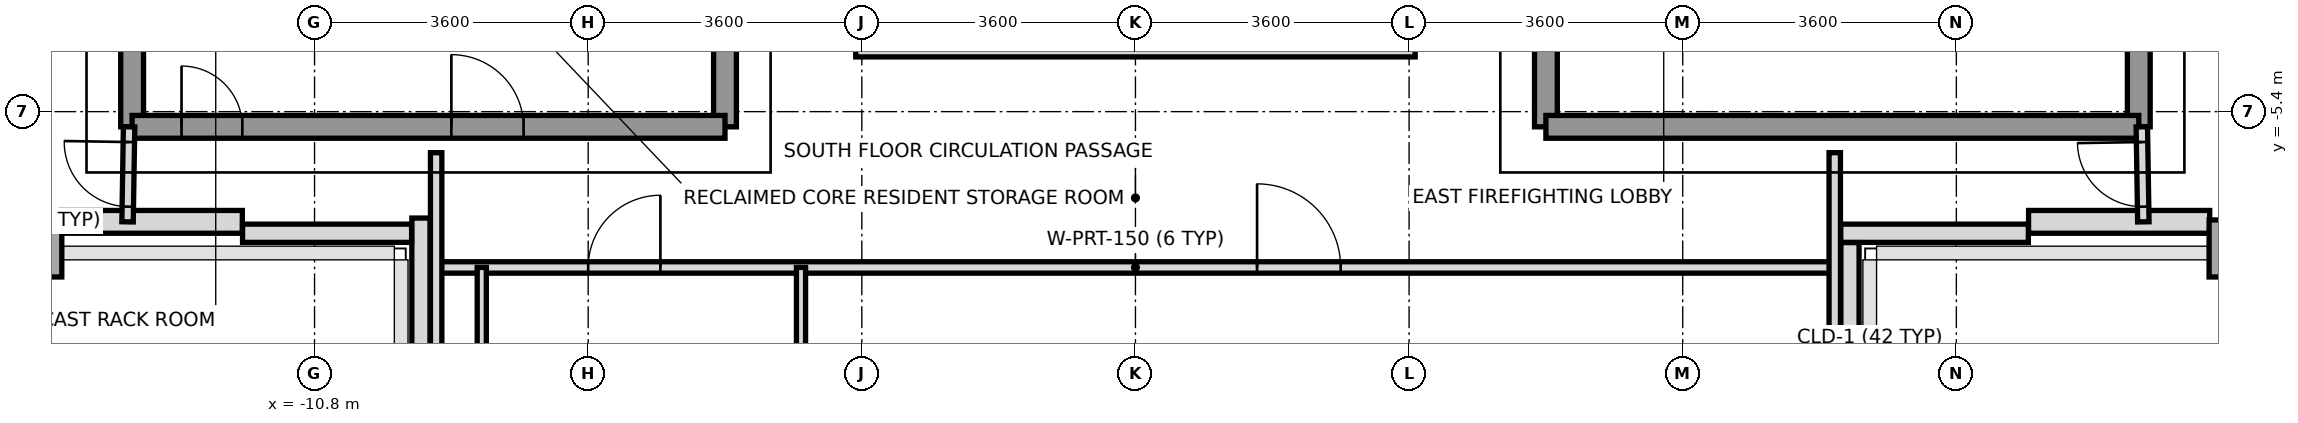
"""IFC4 building model, lengths in metres.
Left out: names, types, materials, properties, quantities, classifications, styles, units other than length and angle.
Written with IfcOpenShell. Run it as: python <this file> out.ifc"""

import sys

from ifc_helpers import new_model, si_unit, direction, frame, frame_2d, origin, origin_2d, place, context, subcontext, project, spatial, rectangle, extrude, source, transform, mapped, element, fill, save


model = new_model("IFC4")
c1 = context("Model", 3, precision=1e-05, world=origin(), true_north=direction((0.0, 1.0)))
c2 = subcontext(c1, "Body", "Model", "MODEL_VIEW")
j1 = project(units=[si_unit("LENGTHUNIT", "METRE"), si_unit("PLANEANGLEUNIT", "RADIAN")], contexts=[c1])
p1 = place(None, origin())
s1 = spatial("IfcSite", under=j1, at=p1, CompositionType="ELEMENT")
p2 = place(p1, origin())
s2 = spatial("IfcBuilding", under=s1, at=p2, CompositionType="ELEMENT")
p3 = place(p2, frame((0.0, 0.0, 242.8)))
s3 = spatial("IfcBuildingStorey", under=s2, at=p3, CompositionType="ELEMENT", Elevation=242.8)
m1 = source(origin(), c2, "Body", "SweptSolid", [
    extrude(rectangle(XDim=0.55, YDim=0.75, at=origin_2d()), origin(), (0.0, 0.0, 1.0), 3.01),
])
for number, where, z_axis, x_axis in (
    (1, (-14.4, -7.2, 0.0), (0.0, 0.0, 1.0), (1.0, 0.0, 0.0)),
    (2, (14.4, -7.2, 0.0), (0.0, 0.0, 1.0), (1.0, 0.0, 0.0)),
):
    element("IfcColumn", number, at=place(p3, frame(where, z_axis=z_axis, x_axis=x_axis)), inside=s3, PredefinedType="COLUMN", context=c2, shape_type="MappedRepresentation", body=[
        mapped(m1, transform((0.0, 0.0, 0.0), x_axis=(1.0, 0.0, 0.0), y_axis=(0.0, 1.0, 0.0), z_axis=(0.0, 0.0, 1.0), scale=1.0)),
    ])
for number, where, z_axis, x_axis in (
    (3, (-14.133, -6.85, 0.0), (0.0, 0.0, 1.0), (1.0, 0.0, 0.0)),
    (4, (11.75, -6.85, 0.0), (0.0, 0.0, 1.0), (1.0, 0.0, 0.0)),
):
    element("IfcWall", number, at=place(p3, frame(where, z_axis=z_axis, x_axis=x_axis)), inside=s3, PredefinedType="SOLIDWALL", context=c2, shape_type="SweptSolid", body=[
        extrude(rectangle(XDim=2.383, YDim=0.3, at=frame_2d((1.191, 0.0))), origin(), (0.0, 0.0, 1.0), 2.57),
    ])
p4 = place(p3, frame((11.747, -7.0, 0.0), z_axis=(0.0, 0.0, 1.0), x_axis=(-1.0, 0.0, 0.0)))
e5 = element("IfcWall", 5, at=p4, inside=s3, PredefinedType="PARAPET", context=c2, shape_type="SweptSolid", body=[
    extrude(rectangle(XDim=2.469, YDim=0.24, at=frame_2d((1.234, 0.0))), origin(), (0.0, 0.0, 1.0), 1.15),
])
p5 = place(p3, frame((9.4, -7.123, 0.0), z_axis=(0.0, 0.0, 1.0), x_axis=(0.0, -1.0, 0.0)))
e6 = element("IfcWall", 6, at=p5, inside=s3, PredefinedType="PARAPET", context=c2, shape_type="SweptSolid", body=[
    extrude(rectangle(XDim=1.499, YDim=0.24, at=frame_2d((0.75, 0.0))), origin(), (0.0, 0.0, 1.0), 1.15),
])
p6 = place(p3, frame((-9.4, -8.622, 0.0), z_axis=(0.0, 0.0, 1.0), x_axis=(0.0, 1.0, 0.0)))
e7 = element("IfcWall", 7, at=p6, inside=s3, PredefinedType="PARAPET", context=c2, shape_type="SweptSolid", body=[
    extrude(rectangle(XDim=1.822, YDim=0.24, at=frame_2d((0.911, 0.0))), origin(), (0.0, 0.0, 1.0), 1.15),
])
p7 = place(p3, frame((-9.523, -7.0, 0.0), z_axis=(0.0, 0.0, 1.0), x_axis=(-1.0, 0.0, 0.0)))
e8 = element("IfcWall", 8, at=p7, inside=s3, PredefinedType="PARAPET", context=c2, shape_type="SweptSolid", body=[
    extrude(rectangle(XDim=2.224, YDim=0.24, at=frame_2d((1.112, 0.0))), origin(), (0.0, 0.0, 1.0), 1.15),
])
p8 = place(p3, frame((-13.2, -5.6, 0.0), z_axis=(0.0, 0.0, 1.0), x_axis=(0.0, 1.0, 0.0)))
e9 = element("IfcWall", 9, at=p8, inside=s3, PredefinedType="SHEAR", context=c2, shape_type="SweptSolid", body=[
    extrude(rectangle(XDim=11.2, YDim=0.3, at=frame_2d((5.6, 0.0))), origin(), (0.0, 0.0, 1.0), 3.01),
])
p9 = place(p3, frame((-5.4, -5.6, 0.0), z_axis=(0.0, 0.0, 1.0), x_axis=(0.0, 1.0, 0.0)))
e10 = element("IfcWall", 10, at=p9, inside=s3, PredefinedType="SHEAR", context=c2, shape_type="SweptSolid", body=[
    extrude(rectangle(XDim=12.5, YDim=0.3, at=frame_2d((6.25, 0.0))), origin(), (0.0, 0.0, 1.0), 3.01),
])
p10 = place(p9, frame((4.55, 0.0, 0.0)))
e11 = element("IfcOpeningElement", 11, at=p10, cuts=e10, PredefinedType="OPENING", context=c2, shape_type="SweptSolid", body=[
    extrude(rectangle(XDim=1.2, YDim=2.2, at=frame_2d((0.6, 1.1))), frame((0.0, 0.16, 0.0), z_axis=(0.0, -1.0, 0.0), x_axis=(1.0, 0.0, 0.0)), (0.0, 0.0, 1.0), 0.32),
])
p11 = place(p9, frame((10.45, 0.0, 0.0)))
e12 = element("IfcOpeningElement", 12, at=p11, cuts=e10, PredefinedType="OPENING", context=c2, shape_type="SweptSolid", body=[
    extrude(rectangle(XDim=1.2, YDim=2.2, at=frame_2d((0.6, 1.1))), frame((0.0, 0.16, 0.0), z_axis=(0.0, -1.0, 0.0), x_axis=(1.0, 0.0, 0.0)), (0.0, 0.0, 1.0), 0.32),
])
p12 = place(p9, frame((6.86, 0.0, 0.0)))
e13 = element("IfcOpeningElement", 13, at=p12, cuts=e10, PredefinedType="OPENING", context=c2, shape_type="SweptSolid", body=[
    extrude(rectangle(XDim=0.8, YDim=2.1, at=frame_2d((0.4, 1.05))), frame((0.0, 0.16, 0.0), z_axis=(0.0, -1.0, 0.0), x_axis=(1.0, 0.0, 0.0)), (0.0, 0.0, 1.0), 0.32),
])
p13 = place(p3, frame((-13.2, -5.6, 0.0), z_axis=(0.0, 0.0, 1.0), x_axis=(1.0, 0.0, 0.0)))
e14 = element("IfcWall", 14, at=p13, inside=s3, PredefinedType="SHEAR", context=c2, shape_type="SweptSolid", body=[
    extrude(rectangle(XDim=7.8, YDim=0.3, at=frame_2d((3.9, 0.0))), origin(), (0.0, 0.0, 1.0), 3.01),
])
p14 = place(p13, frame((0.65, 0.0, 0.0)))
e15 = element("IfcOpeningElement", 15, at=p14, cuts=e14, PredefinedType="OPENING", context=c2, shape_type="SweptSolid", body=[
    extrude(rectangle(XDim=0.8, YDim=2.1, at=frame_2d((0.4, 1.05))), frame((0.0, 0.16, 0.0), z_axis=(0.0, -1.0, 0.0), x_axis=(1.0, 0.0, 0.0)), (0.0, 0.0, 1.0), 0.32),
])
p15 = place(p13, frame((4.2, 0.0, 0.0)))
e16 = element("IfcOpeningElement", 16, at=p15, cuts=e14, PredefinedType="OPENING", context=c2, shape_type="SweptSolid", body=[
    extrude(rectangle(XDim=0.95, YDim=2.15, at=frame_2d((0.475, 1.075))), frame((0.0, 0.16, 0.0), z_axis=(0.0, -1.0, 0.0), x_axis=(1.0, 0.0, 0.0)), (0.0, 0.0, 1.0), 0.32),
])
p16 = place(p3, frame((13.2, -5.6, 0.0), z_axis=(0.0, 0.0, 1.0), x_axis=(0.0, 1.0, 0.0)))
e17 = element("IfcWall", 17, at=p16, inside=s3, PredefinedType="SHEAR", context=c2, shape_type="SweptSolid", body=[
    extrude(rectangle(XDim=11.2, YDim=0.3, at=frame_2d((5.6, 0.0))), origin(), (0.0, 0.0, 1.0), 3.01),
])
p17 = place(p3, frame((5.4, -5.6, 0.0), z_axis=(0.0, 0.0, 1.0), x_axis=(0.0, 1.0, 0.0)))
e18 = element("IfcWall", 18, at=p17, inside=s3, PredefinedType="SHEAR", context=c2, shape_type="SweptSolid", body=[
    extrude(rectangle(XDim=12.5, YDim=0.3, at=frame_2d((6.25, 0.0))), origin(), (0.0, 0.0, 1.0), 3.01),
])
p18 = place(p17, frame((4.55, 0.0, 0.0)))
e19 = element("IfcOpeningElement", 19, at=p18, cuts=e18, PredefinedType="OPENING", context=c2, shape_type="SweptSolid", body=[
    extrude(rectangle(XDim=1.2, YDim=2.2, at=frame_2d((0.6, 1.1))), frame((0.0, 0.16, 0.0), z_axis=(0.0, -1.0, 0.0), x_axis=(1.0, 0.0, 0.0)), (0.0, 0.0, 1.0), 0.32),
])
p19 = place(p17, frame((10.45, 0.0, 0.0)))
e20 = element("IfcOpeningElement", 20, at=p19, cuts=e18, PredefinedType="OPENING", context=c2, shape_type="SweptSolid", body=[
    extrude(rectangle(XDim=1.2, YDim=2.2, at=frame_2d((0.6, 1.1))), frame((0.0, 0.16, 0.0), z_axis=(0.0, -1.0, 0.0), x_axis=(1.0, 0.0, 0.0)), (0.0, 0.0, 1.0), 0.32),
])
p20 = place(p17, frame((6.86, 0.0, 0.0)))
e21 = element("IfcOpeningElement", 21, at=p20, cuts=e18, PredefinedType="OPENING", context=c2, shape_type="SweptSolid", body=[
    extrude(rectangle(XDim=0.8, YDim=2.1, at=frame_2d((0.4, 1.05))), frame((0.0, 0.16, 0.0), z_axis=(0.0, -1.0, 0.0), x_axis=(1.0, 0.0, 0.0)), (0.0, 0.0, 1.0), 0.32),
])
p21 = place(p3, frame((5.4, -5.6, 0.0), z_axis=(0.0, 0.0, 1.0), x_axis=(1.0, 0.0, 0.0)))
e22 = element("IfcWall", 22, at=p21, inside=s3, PredefinedType="SHEAR", context=c2, shape_type="SweptSolid", body=[
    extrude(rectangle(XDim=7.8, YDim=0.3, at=frame_2d((3.9, 0.0))), origin(), (0.0, 0.0, 1.0), 3.01),
])
p22 = place(p3, frame((-9.2, -7.45, 0.0), z_axis=(0.0, 0.0, 1.0), x_axis=(1.0, 0.0, 0.0)))
e23 = element("IfcWall", 23, at=p22, inside=s3, PredefinedType="PARTITIONING", context=c2, shape_type="SweptSolid", body=[
    extrude(rectangle(XDim=18.4, YDim=0.15, at=frame_2d((9.2, 0.0))), origin(), (0.0, 0.0, 1.0), 2.57),
])
p23 = place(p22, frame((2.0, 0.0, 0.0)))
e24 = element("IfcOpeningElement", 24, at=p23, cuts=e23, PredefinedType="OPENING", context=c2, shape_type="SweptSolid", body=[
    extrude(rectangle(XDim=0.95, YDim=2.15, at=frame_2d((0.475, 1.075))), frame((0.0, 0.085, 0.0), z_axis=(0.0, -1.0, 0.0), x_axis=(1.0, 0.0, 0.0)), (0.0, 0.0, 1.0), 0.17),
])
p24 = place(p22, frame((10.8, 0.0, 0.0)))
e25 = element("IfcOpeningElement", 25, at=p24, cuts=e23, PredefinedType="OPENING", context=c2, shape_type="SweptSolid", body=[
    extrude(rectangle(XDim=1.1, YDim=2.2, at=frame_2d((0.55, 1.1))), frame((0.0, 0.085, 0.0), z_axis=(0.0, -1.0, 0.0), x_axis=(1.0, 0.0, 0.0)), (0.0, 0.0, 1.0), 0.17),
])
for number, where, z_axis, x_axis in (
    (26, (-9.2, -10.28, 0.0), (0.0, 0.0, 1.0), (0.0, 1.0, 0.0)),
    (27, (9.2, -10.28, 0.0), (0.0, 0.0, 1.0), (0.0, 1.0, 0.0)),
):
    element("IfcWall", number, at=place(p3, frame(where, z_axis=z_axis, x_axis=x_axis)), inside=s3, PredefinedType="PARTITIONING", context=c2, shape_type="SweptSolid", body=[
        extrude(rectangle(XDim=4.34, YDim=0.15, at=frame_2d((2.17, 0.0))), origin(), (0.0, 0.0, 1.0), 2.61),
    ])
for number, where, z_axis, x_axis in (
    (28, (-8.6, -11.05, 0.0), (0.0, 0.0, 1.0), (0.0, 1.0, 0.0)),
    (29, (-4.4, -11.05, 0.0), (0.0, 0.0, 1.0), (0.0, 1.0, 0.0)),
):
    element("IfcWall", number, at=place(p3, frame(where, z_axis=z_axis, x_axis=x_axis)), inside=s3, PredefinedType="PARTITIONING", context=c2, shape_type="SweptSolid", body=[
        extrude(rectangle(XDim=3.6, YDim=0.12, at=frame_2d((1.8, 0.0))), origin(), (0.0, 0.0, 1.0), 2.61),
    ])
p25 = place(p3, frame((-13.26, -6.85, 0.0), z_axis=(0.0, 0.0, 1.0), x_axis=(0.016013571389, 0.999871774545, 0.0)))
e30 = element("IfcWall", 30, at=p25, inside=s3, PredefinedType="PARTITIONING", context=c2, shape_type="SweptSolid", body=[
    extrude(rectangle(XDim=1.25, YDim=0.15, at=frame_2d((0.625, 0.0))), origin(), (0.0, 0.0, 1.0), 3.01),
])
p26 = place(p25, frame((0.2, 0.0, 0.0)))
e31 = element("IfcOpeningElement", 31, at=p26, cuts=e30, PredefinedType="OPENING", context=c2, shape_type="SweptSolid", body=[
    extrude(rectangle(XDim=0.85, YDim=2.1, at=frame_2d((0.425, 1.05))), frame((0.0, 0.085, 0.0), z_axis=(0.0, -1.0, 0.0), x_axis=(1.0, 0.0, 0.0)), (0.0, 0.0, 1.0), 0.17),
])
p27 = place(p3, frame((13.26, -6.85, 0.0), z_axis=(0.0, 0.0, 1.0), x_axis=(-0.016013571389, 0.999871774545, 0.0)))
e32 = element("IfcWall", 32, at=p27, inside=s3, PredefinedType="PARTITIONING", context=c2, shape_type="SweptSolid", body=[
    extrude(rectangle(XDim=1.25, YDim=0.15, at=frame_2d((0.625, 0.0))), origin(), (0.0, 0.0, 1.0), 3.01),
])
p28 = place(p27, frame((0.2, 0.0, 0.0)))
e33 = element("IfcOpeningElement", 33, at=p28, cuts=e32, PredefinedType="OPENING", context=c2, shape_type="SweptSolid", body=[
    extrude(rectangle(XDim=0.85, YDim=2.1, at=frame_2d((0.425, 1.05))), frame((0.0, 0.085, 0.0), z_axis=(0.0, -1.0, 0.0), x_axis=(1.0, 0.0, 0.0)), (0.0, 0.0, 1.0), 0.17),
])
p29 = place(p3, frame((-3.68, -4.56, 0.0), z_axis=(0.0, 0.0, 1.0), x_axis=(1.0, 0.0, 0.0)))
e34 = element("IfcWall", 34, at=p29, inside=s3, PredefinedType="PARAPET", context=c2, shape_type="SweptSolid", body=[
    extrude(rectangle(XDim=7.36, YDim=0.24, at=frame_2d((3.68, 0.0))), origin(), (0.0, 0.0, 1.0), 1.15),
])
m2 = source(origin(), c2, "Body", "SweptSolid", [
    extrude(rectangle(XDim=0.8, YDim=2.1, at=frame_2d((0.4, 1.05))), frame((0.0, 0.025, 0.0), z_axis=(0.0, -1.0, 0.0), x_axis=(1.0, 0.0, 0.0)), (0.0, 0.0, 1.0), 0.05),
])
p30 = place(p14, origin())
e35 = element("IfcDoor", 35, at=p30, inside=s3, OperationType="SINGLE_SWING_LEFT", PredefinedType="DOOR", context=c2, shape_type="MappedRepresentation", body=[
    mapped(m2, transform((0.0, 0.0, 0.0), x_axis=(1.0, 0.0, 0.0), y_axis=(0.0, 1.0, 0.0), z_axis=(0.0, 0.0, 1.0), scale=1.0)),
])
fill(e15, e35)
m3 = source(origin(), c2, "Body", "SweptSolid", [
    extrude(rectangle(XDim=0.95, YDim=2.15, at=frame_2d((0.475, 1.075))), frame((0.0, 0.025, 0.0), z_axis=(0.0, -1.0, 0.0), x_axis=(1.0, 0.0, 0.0)), (0.0, 0.0, 1.0), 0.05),
])
p31 = place(p15, origin())
e36 = element("IfcDoor", 36, at=p31, inside=s3, OperationType="SINGLE_SWING_LEFT", PredefinedType="DOOR", context=c2, shape_type="MappedRepresentation", body=[
    mapped(m3, transform((0.0, 0.0, 0.0), x_axis=(1.0, 0.0, 0.0), y_axis=(0.0, 1.0, 0.0), z_axis=(0.0, 0.0, 1.0), scale=1.0)),
])
fill(e16, e36)
p32 = place(p23, origin())
e37 = element("IfcDoor", 37, at=p32, inside=s3, OperationType="SINGLE_SWING_RIGHT", PredefinedType="DOOR", context=c2, shape_type="MappedRepresentation", body=[
    mapped(m3, transform((0.0, 0.0, 0.0), x_axis=(1.0, 0.0, 0.0), y_axis=(0.0, 1.0, 0.0), z_axis=(0.0, 0.0, 1.0), scale=1.0)),
])
fill(e24, e37)
m4 = source(origin(), c2, "Body", "SweptSolid", [
    extrude(rectangle(XDim=1.1, YDim=2.2, at=frame_2d((0.55, 1.1))), frame((0.0, 0.025, 0.0), z_axis=(0.0, -1.0, 0.0), x_axis=(1.0, 0.0, 0.0)), (0.0, 0.0, 1.0), 0.05),
])
p33 = place(p24, origin())
e38 = element("IfcDoor", 38, at=p33, inside=s3, OperationType="SINGLE_SWING_LEFT", PredefinedType="DOOR", context=c2, shape_type="MappedRepresentation", body=[
    mapped(m4, transform((0.0, 0.0, 0.0), x_axis=(1.0, 0.0, 0.0), y_axis=(0.0, 1.0, 0.0), z_axis=(0.0, 0.0, 1.0), scale=1.0)),
])
fill(e25, e38)
m5 = source(origin(), c2, "Body", "SweptSolid", [
    extrude(rectangle(XDim=0.85, YDim=2.1, at=frame_2d((0.425, 1.05))), frame((0.0, 0.025, 0.0), z_axis=(0.0, -1.0, 0.0), x_axis=(1.0, 0.0, 0.0)), (0.0, 0.0, 1.0), 0.05),
])
p34 = place(p26, origin())
e39 = element("IfcDoor", 39, at=p34, inside=s3, OperationType="SINGLE_SWING_RIGHT", PredefinedType="DOOR", context=c2, shape_type="MappedRepresentation", body=[
    mapped(m5, transform((0.0, 0.0, 0.0), x_axis=(1.0, 0.0, 0.0), y_axis=(0.0, 1.0, 0.0), z_axis=(0.0, 0.0, 1.0), scale=1.0)),
])
fill(e31, e39)
p35 = place(p28, origin())
e40 = element("IfcDoor", 40, at=p35, inside=s3, OperationType="SINGLE_SWING_RIGHT", PredefinedType="DOOR", context=c2, shape_type="MappedRepresentation", body=[
    mapped(m5, transform((0.0, 0.0, 0.0), x_axis=(1.0, 0.0, 0.0), y_axis=(0.0, 1.0, 0.0), z_axis=(0.0, 0.0, 1.0), scale=1.0)),
])
fill(e33, e40)
save(model, sys.argv[1])
